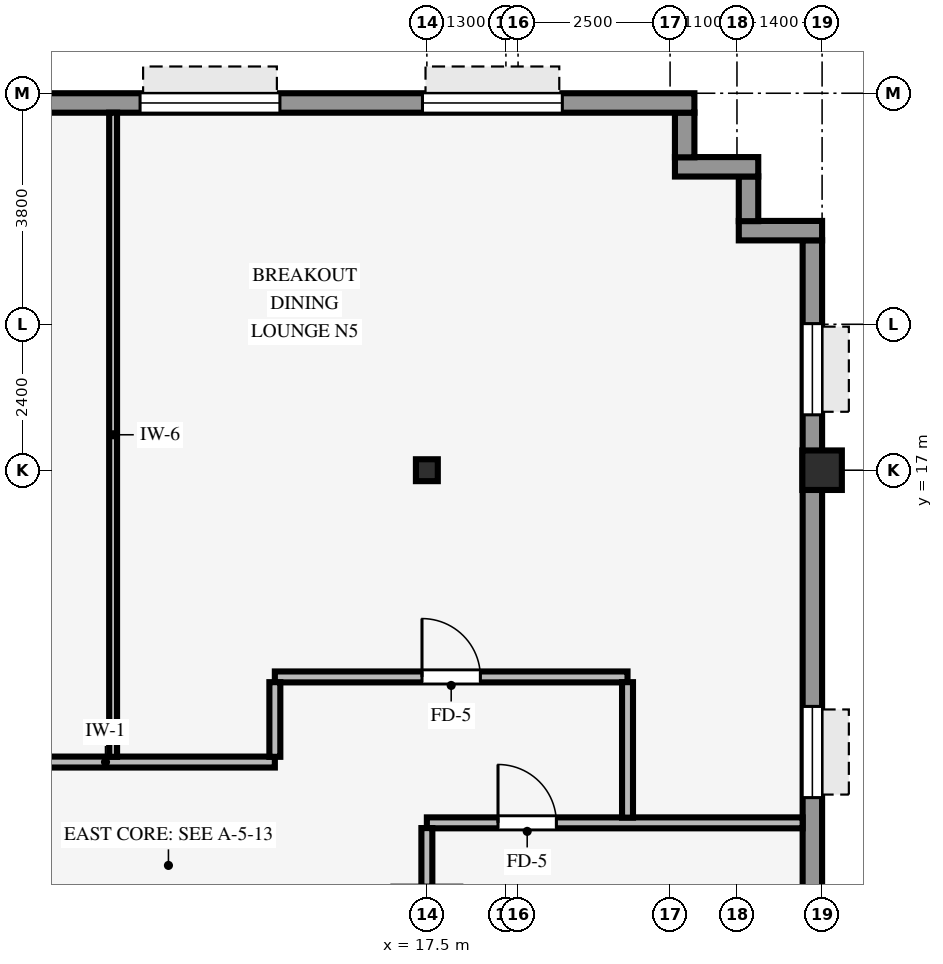
"""IFC4 building model, lengths in metres.
Left out: names, types, materials, properties, quantities, classifications, styles, units other than length and angle.
Written with IfcOpenShell. Run it as: python <this file> out.ifc"""

import sys

from ifc_helpers import new_model, si_unit, direction, frame, frame_2d, origin, origin_2d, place, context, subcontext, project, spatial, rectangle, hollow_rectangle, i_section, extrude, source, transform, mapped, element, fill, save


model = new_model("IFC4")
c1 = context("Model", 3, precision=1e-05, world=origin(), true_north=direction((0.0, 1.0)))
c2 = subcontext(c1, "Body", "Model", "MODEL_VIEW")
j1 = project(units=[si_unit("LENGTHUNIT", "METRE"), si_unit("PLANEANGLEUNIT", "RADIAN")], contexts=[c1])
p1 = place(None, origin())
s1 = spatial("IfcSite", under=j1, at=p1, CompositionType="ELEMENT")
p2 = place(p1, origin())
s2 = spatial("IfcBuilding", under=s1, at=p2, CompositionType="ELEMENT")
p3 = place(p2, frame((0.0, 0.0, 101.95)))
s3 = spatial("IfcBuildingStorey", under=s2, at=p3, CompositionType="ELEMENT", Elevation=101.95)
p4 = place(p3, frame((24.0, 17.0, 0.0), z_axis=(0.0, 0.0, 1.0), x_axis=(1.0, 0.0, 0.0)))
e1 = element("IfcColumn", 1, at=p4, inside=s3, PredefinedType="COLUMN", context=c2, shape_type="SweptSolid", body=[
    extrude(hollow_rectangle(XDim=0.65, YDim=0.65, WallThickness=0.04, InnerFilletRadius=0.04, OuterFilletRadius=0.08, at=origin_2d()), origin(), (0.0, 0.0, 1.0), 3.37),
])
p5 = place(p3, frame((17.5, 17.0, 0.0), z_axis=(0.0, 0.0, 1.0), x_axis=(1.0, 0.0, 0.0)))
e2 = element("IfcColumn", 2, at=p5, inside=s3, PredefinedType="COLUMN", context=c2, shape_type="SweptSolid", body=[
    extrude(i_section(OverallWidth=0.36, OverallDepth=0.36, WebThickness=0.021, FlangeThickness=0.021, FilletRadius=0.018, at=origin_2d()), origin(), (0.0, 0.0, 1.0), 3.37),
])
p6 = place(p3, frame((23.84, -20.784, 0.0), z_axis=(0.0, 0.0, 1.0), x_axis=(0.0, 1.0, 0.0)))
e3 = element("IfcWall", 3, at=p6, inside=s3, PredefinedType="STANDARD", context=c2, shape_type="SweptSolid", body=[
    extrude(rectangle(XDim=41.568, YDim=0.32, at=frame_2d((20.784, 0.0))), origin(), (0.0, 0.0, 1.0), 2.705),
])
p7 = place(p6, frame((1.373, 0.0, 0.8)))
e4 = element("IfcOpeningElement", 4, at=p7, cuts=e3, PredefinedType="OPENING", context=c2, shape_type="SweptSolid", body=[
    extrude(rectangle(XDim=1.5, YDim=1.6, at=frame_2d((0.75, 0.8))), frame((0.0, 0.17, 0.0), z_axis=(0.0, -1.0, 0.0), x_axis=(1.0, 0.0, 0.0)), (0.0, 0.0, 1.0), 0.34),
])
p8 = place(p6, frame((7.669, 0.0, 0.8)))
e5 = element("IfcOpeningElement", 5, at=p8, cuts=e3, PredefinedType="OPENING", context=c2, shape_type="SweptSolid", body=[
    extrude(rectangle(XDim=1.5, YDim=1.6, at=frame_2d((0.75, 0.8))), frame((0.0, 0.17, 0.0), z_axis=(0.0, -1.0, 0.0), x_axis=(1.0, 0.0, 0.0)), (0.0, 0.0, 1.0), 0.34),
])
p9 = place(p6, frame((12.615, 0.0, 0.8)))
e6 = element("IfcOpeningElement", 6, at=p9, cuts=e3, PredefinedType="OPENING", context=c2, shape_type="SweptSolid", body=[
    extrude(rectangle(XDim=1.5, YDim=1.6, at=frame_2d((0.75, 0.8))), frame((0.0, 0.17, 0.0), z_axis=(0.0, -1.0, 0.0), x_axis=(1.0, 0.0, 0.0)), (0.0, 0.0, 1.0), 0.34),
])
p10 = place(p6, frame((17.561, 0.0, 0.8)))
e7 = element("IfcOpeningElement", 7, at=p10, cuts=e3, PredefinedType="OPENING", context=c2, shape_type="SweptSolid", body=[
    extrude(rectangle(XDim=1.5, YDim=1.6, at=frame_2d((0.75, 0.8))), frame((0.0, 0.17, 0.0), z_axis=(0.0, -1.0, 0.0), x_axis=(1.0, 0.0, 0.0)), (0.0, 0.0, 1.0), 0.34),
])
p11 = place(p6, frame((22.507, 0.0, 0.8)))
e8 = element("IfcOpeningElement", 8, at=p11, cuts=e3, PredefinedType="OPENING", context=c2, shape_type="SweptSolid", body=[
    extrude(rectangle(XDim=1.5, YDim=1.6, at=frame_2d((0.75, 0.8))), frame((0.0, 0.17, 0.0), z_axis=(0.0, -1.0, 0.0), x_axis=(1.0, 0.0, 0.0)), (0.0, 0.0, 1.0), 0.34),
])
p12 = place(p6, frame((27.453, 0.0, 0.8)))
e9 = element("IfcOpeningElement", 9, at=p12, cuts=e3, PredefinedType="OPENING", context=c2, shape_type="SweptSolid", body=[
    extrude(rectangle(XDim=1.5, YDim=1.6, at=frame_2d((0.75, 0.8))), frame((0.0, 0.17, 0.0), z_axis=(0.0, -1.0, 0.0), x_axis=(1.0, 0.0, 0.0)), (0.0, 0.0, 1.0), 0.34),
])
p13 = place(p6, frame((32.399, 0.0, 0.8)))
e10 = element("IfcOpeningElement", 10, at=p13, cuts=e3, PredefinedType="OPENING", context=c2, shape_type="SweptSolid", body=[
    extrude(rectangle(XDim=1.5, YDim=1.6, at=frame_2d((0.75, 0.8))), frame((0.0, 0.17, 0.0), z_axis=(0.0, -1.0, 0.0), x_axis=(1.0, 0.0, 0.0)), (0.0, 0.0, 1.0), 0.34),
])
p14 = place(p6, frame((38.695, 0.0, 0.8)))
e11 = element("IfcOpeningElement", 11, at=p14, cuts=e3, PredefinedType="OPENING", context=c2, shape_type="SweptSolid", body=[
    extrude(rectangle(XDim=1.5, YDim=1.6, at=frame_2d((0.75, 0.8))), frame((0.0, 0.17, 0.0), z_axis=(0.0, -1.0, 0.0), x_axis=(1.0, 0.0, 0.0)), (0.0, 0.0, 1.0), 0.34),
])
p15 = place(p3, frame((22.63, 20.94, 0.0), z_axis=(0.0, 0.0, 1.0), x_axis=(1.0, 0.0, 0.0)))
e12 = element("IfcWall", 12, at=p15, inside=s3, PredefinedType="STANDARD", context=c2, shape_type="SweptSolid", body=[
    extrude(rectangle(XDim=1.37, YDim=0.32, at=frame_2d((0.685, 0.0))), origin(), (0.0, 0.0, 1.0), 3.36),
])
p16 = place(p3, frame((22.79, 21.096, 0.0), z_axis=(0.0, 0.0, 1.0), x_axis=(0.0, 1.0, 0.0)))
e13 = element("IfcWall", 13, at=p16, inside=s3, PredefinedType="STANDARD", context=c2, shape_type="SweptSolid", body=[
    extrude(rectangle(XDim=0.738, YDim=0.32, at=frame_2d((0.369, 0.0))), origin(), (0.0, 0.0, 1.0), 3.36),
])
p17 = place(p3, frame((21.58, 21.99, 0.0), z_axis=(0.0, 0.0, 1.0), x_axis=(1.0, 0.0, 0.0)))
e14 = element("IfcWall", 14, at=p17, inside=s3, PredefinedType="STANDARD", context=c2, shape_type="SweptSolid", body=[
    extrude(rectangle(XDim=1.37, YDim=0.32, at=frame_2d((0.685, 0.0))), origin(), (0.0, 0.0, 1.0), 3.36),
])
p18 = place(p3, frame((21.74, 22.146, 0.0), z_axis=(0.0, 0.0, 1.0), x_axis=(0.0, 1.0, 0.0)))
e15 = element("IfcWall", 15, at=p18, inside=s3, PredefinedType="STANDARD", context=c2, shape_type="SweptSolid", body=[
    extrude(rectangle(XDim=0.738, YDim=0.32, at=frame_2d((0.369, 0.0))), origin(), (0.0, 0.0, 1.0), 3.36),
])
p19 = place(p3, frame((-21.9, 23.04, 0.0), z_axis=(0.0, 0.0, 1.0), x_axis=(1.0, 0.0, 0.0)))
e16 = element("IfcWall", 16, at=p19, inside=s3, PredefinedType="STANDARD", context=c2, shape_type="SweptSolid", body=[
    extrude(rectangle(XDim=43.8, YDim=0.32, at=frame_2d((21.9, 0.0))), origin(), (0.0, 0.0, 1.0), 2.705),
])
p20 = place(p19, frame((26.85, 0.0, 0.0)))
e17 = element("IfcOpeningElement", 17, at=p20, cuts=e16, PredefinedType="OPENING", context=c2, shape_type="SweptSolid", body=[
    extrude(rectangle(XDim=1.05, YDim=2.1, at=frame_2d((0.525, 1.05))), frame((0.0, 0.17, 0.0), z_axis=(0.0, -1.0, 0.0), x_axis=(1.0, 0.0, 0.0)), (0.0, 0.0, 1.0), 0.34),
])
p21 = place(p19, frame((2.172, 0.0, 0.8)))
e18 = element("IfcOpeningElement", 18, at=p21, cuts=e16, PredefinedType="OPENING", context=c2, shape_type="SweptSolid", body=[
    extrude(rectangle(XDim=2.3, YDim=1.62, at=frame_2d((1.15, 0.81))), frame((0.0, 0.17, 0.0), z_axis=(0.0, -1.0, 0.0), x_axis=(1.0, 0.0, 0.0)), (0.0, 0.0, 1.0), 0.34),
])
p22 = place(p19, frame((5.917, 0.0, 0.8)))
e19 = element("IfcOpeningElement", 19, at=p22, cuts=e16, PredefinedType="OPENING", context=c2, shape_type="SweptSolid", body=[
    extrude(rectangle(XDim=2.3, YDim=1.62, at=frame_2d((1.15, 0.81))), frame((0.0, 0.17, 0.0), z_axis=(0.0, -1.0, 0.0), x_axis=(1.0, 0.0, 0.0)), (0.0, 0.0, 1.0), 0.34),
])
p23 = place(p19, frame((16.106, 0.0, 0.8)))
e20 = element("IfcOpeningElement", 20, at=p23, cuts=e16, PredefinedType="OPENING", context=c2, shape_type="SweptSolid", body=[
    extrude(rectangle(XDim=2.3, YDim=1.62, at=frame_2d((1.15, 0.81))), frame((0.0, 0.17, 0.0), z_axis=(0.0, -1.0, 0.0), x_axis=(1.0, 0.0, 0.0)), (0.0, 0.0, 1.0), 0.34),
])
p24 = place(p19, frame((34.683, 0.0, 0.8)))
e21 = element("IfcOpeningElement", 21, at=p24, cuts=e16, PredefinedType="OPENING", context=c2, shape_type="SweptSolid", body=[
    extrude(rectangle(XDim=2.3, YDim=1.62, at=frame_2d((1.15, 0.81))), frame((0.0, 0.17, 0.0), z_axis=(0.0, -1.0, 0.0), x_axis=(1.0, 0.0, 0.0)), (0.0, 0.0, 1.0), 0.34),
])
p25 = place(p19, frame((39.328, 0.0, 0.8)))
e22 = element("IfcOpeningElement", 22, at=p25, cuts=e16, PredefinedType="OPENING", context=c2, shape_type="SweptSolid", body=[
    extrude(rectangle(XDim=2.3, YDim=1.62, at=frame_2d((1.15, 0.81))), frame((0.0, 0.17, 0.0), z_axis=(0.0, -1.0, 0.0), x_axis=(1.0, 0.0, 0.0)), (0.0, 0.0, 1.0), 0.34),
])
p26 = place(p3, frame((17.5, 11.2, 0.0), z_axis=(0.0, 0.0, 1.0), x_axis=(1.0, 0.0, 0.0)))
e23 = element("IfcWall", 23, at=p26, inside=s3, PredefinedType="PARTITIONING", context=c2, shape_type="SweptSolid", body=[
    extrude(rectangle(XDim=6.18, YDim=0.18, at=frame_2d((3.09, 0.0))), origin(), (0.0, 0.0, 1.0), 3.36),
])
p27 = place(p26, frame((1.17, 0.0, 0.0)))
e24 = element("IfcOpeningElement", 24, at=p27, cuts=e23, PredefinedType="OPENING", context=c2, shape_type="SweptSolid", body=[
    extrude(rectangle(XDim=0.96, YDim=2.1, at=frame_2d((0.48, 1.05))), frame((0.0, 0.1, 0.0), z_axis=(0.0, -1.0, 0.0), x_axis=(1.0, 0.0, 0.0)), (0.0, 0.0, 1.0), 0.2),
])
p28 = place(p3, frame((-15.0, 12.2, 0.0), z_axis=(0.0, 0.0, 1.0), x_axis=(1.0, 0.0, 0.0)))
e25 = element("IfcWall", 25, at=p28, inside=s3, PredefinedType="PARTITIONING", context=c2, shape_type="SweptSolid", body=[
    extrude(rectangle(XDim=30.0, YDim=0.18, at=frame_2d((15.0, 0.0))), origin(), (0.0, 0.0, 1.0), 3.36),
])
p29 = place(p28, frame((23.02, 0.0, 0.0)))
e26 = element("IfcOpeningElement", 26, at=p29, cuts=e25, PredefinedType="OPENING", context=c2, shape_type="SweptSolid", body=[
    extrude(rectangle(XDim=0.96, YDim=2.1, at=frame_2d((0.48, 1.05))), frame((0.0, 0.1, 0.0), z_axis=(0.0, -1.0, 0.0), x_axis=(1.0, 0.0, 0.0)), (0.0, 0.0, 1.0), 0.2),
])
p30 = place(p28, frame((16.45, 0.0, 0.0)))
e27 = element("IfcOpeningElement", 27, at=p30, cuts=e25, PredefinedType="OPENING", context=c2, shape_type="SweptSolid", body=[
    extrude(rectangle(XDim=0.96, YDim=2.1, at=frame_2d((0.48, 1.05))), frame((0.0, 0.1, 0.0), z_axis=(0.0, -1.0, 0.0), x_axis=(1.0, 0.0, 0.0)), (0.0, 0.0, 1.0), 0.2),
])
p31 = place(p28, frame((5.45, 0.0, 0.0)))
e28 = element("IfcOpeningElement", 28, at=p31, cuts=e25, PredefinedType="OPENING", context=c2, shape_type="SweptSolid", body=[
    extrude(rectangle(XDim=0.9, YDim=2.1, at=frame_2d((0.45, 1.05))), frame((0.0, 0.1, 0.0), z_axis=(0.0, -1.0, 0.0), x_axis=(1.0, 0.0, 0.0)), (0.0, 0.0, 1.0), 0.2),
])
p32 = place(p28, frame((2.85, 0.0, 0.0)))
e29 = element("IfcOpeningElement", 29, at=p32, cuts=e25, PredefinedType="OPENING", context=c2, shape_type="SweptSolid", body=[
    extrude(rectangle(XDim=0.9, YDim=2.1, at=frame_2d((0.45, 1.05))), frame((0.0, 0.1, 0.0), z_axis=(0.0, -1.0, 0.0), x_axis=(1.0, 0.0, 0.0)), (0.0, 0.0, 1.0), 0.2),
])
p33 = place(p28, frame((12.52, 0.0, 0.0)))
e30 = element("IfcOpeningElement", 30, at=p33, cuts=e25, PredefinedType="OPENING", context=c2, shape_type="SweptSolid", body=[
    extrude(rectangle(XDim=0.96, YDim=2.1, at=frame_2d((0.48, 1.05))), frame((0.0, 0.1, 0.0), z_axis=(0.0, -1.0, 0.0), x_axis=(1.0, 0.0, 0.0)), (0.0, 0.0, 1.0), 0.2),
])
p34 = place(p28, frame((7.95, 0.0, 0.0)))
e31 = element("IfcOpeningElement", 31, at=p34, cuts=e25, PredefinedType="OPENING", context=c2, shape_type="SweptSolid", body=[
    extrude(rectangle(XDim=0.9, YDim=2.1, at=frame_2d((0.45, 1.05))), frame((0.0, 0.1, 0.0), z_axis=(0.0, -1.0, 0.0), x_axis=(1.0, 0.0, 0.0)), (0.0, 0.0, 1.0), 0.2),
])
p35 = place(p3, frame((15.0, 13.6, 0.0), z_axis=(0.0, 0.0, 1.0), x_axis=(1.0, 0.0, 0.0)))
e32 = element("IfcWall", 32, at=p35, inside=s3, PredefinedType="PARTITIONING", context=c2, shape_type="SweptSolid", body=[
    extrude(rectangle(XDim=5.8, YDim=0.18, at=frame_2d((2.9, 0.0))), origin(), (0.0, 0.0, 1.0), 2.998),
])
p36 = place(p35, frame((2.42, 0.0, 0.0)))
e33 = element("IfcOpeningElement", 33, at=p36, cuts=e32, PredefinedType="OPENING", context=c2, shape_type="SweptSolid", body=[
    extrude(rectangle(XDim=0.96, YDim=2.1, at=frame_2d((0.48, 1.05))), frame((0.0, 0.1, 0.0), z_axis=(0.0, -1.0, 0.0), x_axis=(1.0, 0.0, 0.0)), (0.0, 0.0, 1.0), 0.2),
])
p37 = place(p3, frame((12.34, 12.286, 0.0), z_axis=(0.0, 0.0, 1.0), x_axis=(0.0, 1.0, 0.0)))
e34 = element("IfcWall", 34, at=p37, inside=s3, PredefinedType="PARTITIONING", context=c2, shape_type="SweptSolid", body=[
    extrude(rectangle(XDim=10.594, YDim=0.13, at=frame_2d((5.297, 0.0))), origin(), (0.0, 0.0, 1.0), 3.36),
])
p38 = place(p3, frame((15.0, 12.286, 0.0), z_axis=(0.0, 0.0, 1.0), x_axis=(0.0, 1.0, 0.0)))
e35 = element("IfcWall", 35, at=p38, inside=s3, PredefinedType="PARTITIONING", context=c2, shape_type="SweptSolid", body=[
    extrude(rectangle(XDim=1.228, YDim=0.18, at=frame_2d((0.614, 0.0))), origin(), (0.0, 0.0, 1.0), 3.36),
])
p39 = place(p3, frame((17.5, 10.146, 0.0), z_axis=(0.0, 0.0, 1.0), x_axis=(0.0, 1.0, 0.0)))
e36 = element("IfcWall", 36, at=p39, inside=s3, PredefinedType="PARTITIONING", context=c2, shape_type="SweptSolid", body=[
    extrude(rectangle(XDim=0.968, YDim=0.18, at=frame_2d((0.484, 0.0))), origin(), (0.0, 0.0, 1.0), 2.738),
])
p40 = place(p3, frame((20.8, 11.286, 0.0), z_axis=(0.0, 0.0, 1.0), x_axis=(0.0, 1.0, 0.0)))
e37 = element("IfcWall", 37, at=p40, inside=s3, PredefinedType="PARTITIONING", context=c2, shape_type="SweptSolid", body=[
    extrude(rectangle(XDim=2.228, YDim=0.18, at=frame_2d((1.114, 0.0))), origin(), (0.0, 0.0, 1.0), 3.36),
])
m1 = source(origin(), c2, "Body", "SweptSolid", [
    extrude(rectangle(XDim=1.5, YDim=1.6, at=frame_2d((0.75, 0.8))), frame((0.0, 0.03, 0.0), z_axis=(0.0, -1.0, 0.0), x_axis=(1.0, 0.0, 0.0)), (0.0, 0.0, 1.0), 0.06),
])
p41 = place(p13, origin())
e38 = element("IfcWindow", 38, at=p41, inside=s3, PartitioningType="SINGLE_PANEL", PredefinedType="WINDOW", context=c2, shape_type="MappedRepresentation", body=[
    mapped(m1, transform((0.0, 0.0, 0.0), scale=1.0)),
])
fill(e10, e38)
p42 = place(p14, origin())
e39 = element("IfcWindow", 39, at=p42, inside=s3, PartitioningType="SINGLE_PANEL", PredefinedType="WINDOW", context=c2, shape_type="MappedRepresentation", body=[
    mapped(m1, transform((0.0, 0.0, 0.0), scale=1.0)),
])
fill(e11, e39)
m2 = source(origin(), c2, "Body", "SweptSolid", [
    extrude(rectangle(XDim=2.3, YDim=1.62, at=frame_2d((1.15, 0.81))), frame((0.0, 0.03, 0.0), z_axis=(0.0, -1.0, 0.0), x_axis=(1.0, 0.0, 0.0)), (0.0, 0.0, 1.0), 0.06),
])
p43 = place(p24, origin())
e40 = element("IfcWindow", 40, at=p43, inside=s3, PartitioningType="SINGLE_PANEL", PredefinedType="WINDOW", context=c2, shape_type="MappedRepresentation", body=[
    mapped(m2, transform((0.0, 0.0, 0.0), scale=1.0)),
])
fill(e21, e40)
p44 = place(p25, origin())
e41 = element("IfcWindow", 41, at=p44, inside=s3, PartitioningType="SINGLE_PANEL", PredefinedType="WINDOW", context=c2, shape_type="MappedRepresentation", body=[
    mapped(m2, transform((0.0, 0.0, 0.0), scale=1.0)),
])
fill(e22, e41)
m3 = source(origin(), c2, "Body", "SweptSolid", [
    extrude(rectangle(XDim=0.96, YDim=2.1, at=frame_2d((0.48, 1.05))), frame((0.0, 0.025, 0.0), z_axis=(0.0, -1.0, 0.0), x_axis=(1.0, 0.0, 0.0)), (0.0, 0.0, 1.0), 0.05),
])
p45 = place(p36, origin())
e42 = element("IfcDoor", 42, at=p45, inside=s3, OperationType="SINGLE_SWING_LEFT", PredefinedType="DOOR", context=c2, shape_type="MappedRepresentation", body=[
    mapped(m3, transform((0.0, 0.0, 0.0), scale=1.0)),
])
fill(e33, e42)
p46 = place(p27, origin())
e43 = element("IfcDoor", 43, at=p46, inside=s3, OperationType="SINGLE_SWING_LEFT", PredefinedType="DOOR", context=c2, shape_type="MappedRepresentation", body=[
    mapped(m3, transform((0.0, 0.0, 0.0), scale=1.0)),
])
fill(e24, e43)
save(model, sys.argv[1])
